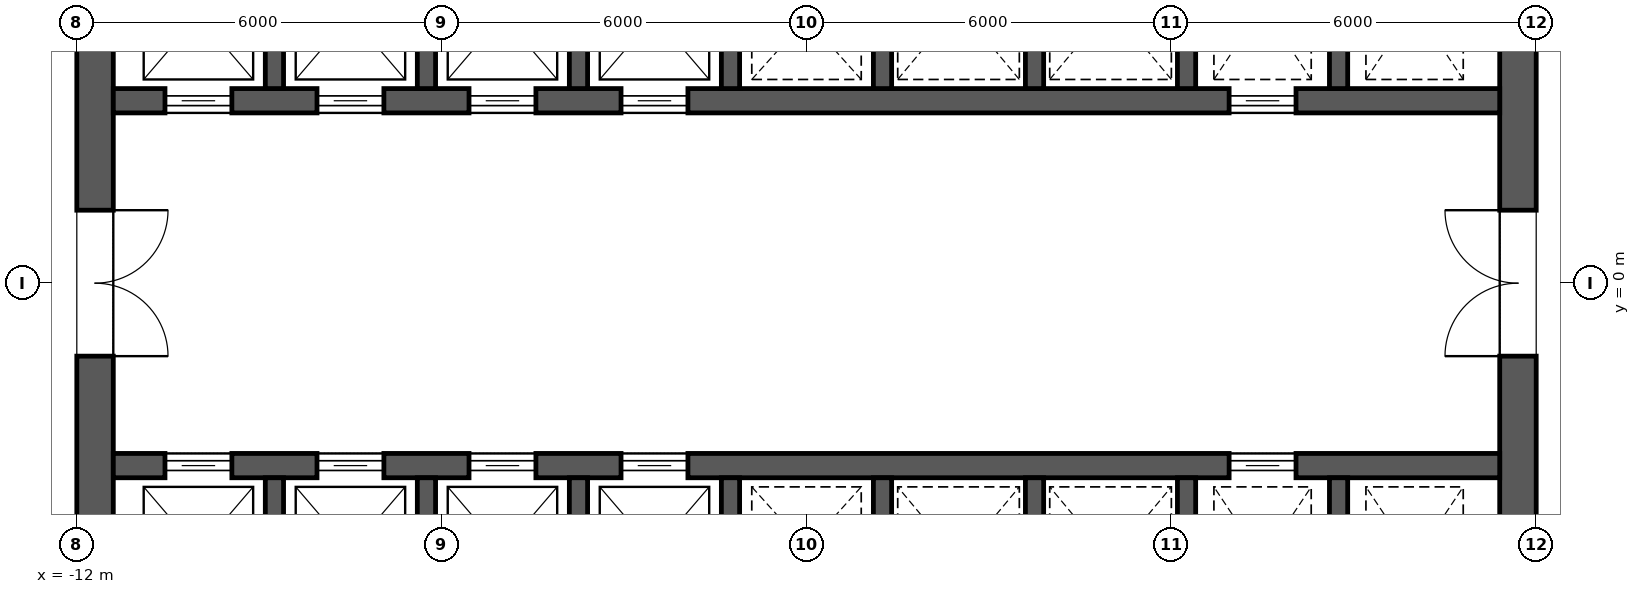
"""IFC4 building model, lengths in metres.
Left out: names, types, materials, properties, quantities, classifications, styles, units other than length and angle.
Written with IfcOpenShell. Run it as: python <this file> out.ifc"""

import sys

from ifc_helpers import new_model, si_unit, direction, frame, frame_2d, origin, place, context, subcontext, project, spatial, rectangle, extrude, element, fill, save


model = new_model("IFC4")
c1 = context("Model", 3, precision=1e-05, world=origin(), true_north=direction((0.0, 1.0)))
c2 = subcontext(c1, "Body", "Model", "MODEL_VIEW")
j1 = project(units=[si_unit("LENGTHUNIT", "METRE"), si_unit("PLANEANGLEUNIT", "RADIAN")], contexts=[c1])
p1 = place(None, origin())
s1 = spatial("IfcSite", under=j1, at=p1, CompositionType="ELEMENT")
p2 = place(p1, origin())
s2 = spatial("IfcBuilding", under=s1, at=p2, CompositionType="ELEMENT")
p3 = place(p2, frame((0.0, 0.0, 73.9)))
s3 = spatial("IfcBuildingStorey", under=s2, at=p3, CompositionType="ELEMENT", Elevation=73.9)
p4 = place(p3, frame((11.7, -11.4, 0.0), z_axis=(0.0, 0.0, 1.0), x_axis=(0.0, 1.0, 0.0)))
e1 = element("IfcWall", 1, at=p4, inside=s3, PredefinedType="SHEAR", context=c2, shape_type="SweptSolid", body=[
    extrude(rectangle(XDim=22.8, YDim=0.6, at=frame_2d((11.4, 0.0))), origin(), (0.0, 0.0, 1.0), 4.2),
])
p5 = place(p4, frame((10.2, 0.0, 0.0)))
e2 = element("IfcOpeningElement", 2, at=p5, cuts=e1, PredefinedType="OPENING", context=c2, shape_type="SweptSolid", body=[
    extrude(rectangle(XDim=2.4, YDim=2.1, at=frame_2d((1.2, 1.05))), frame((0.0, 0.312, 0.0), z_axis=(0.0, -1.0, 0.0), x_axis=(1.0, 0.0, 0.0)), (0.0, 0.0, 1.0), 0.624),
])
p6 = place(p4, frame((19.5, 0.0, 0.0)))
e3 = element("IfcOpeningElement", 3, at=p6, cuts=e1, PredefinedType="OPENING", context=c2, shape_type="SweptSolid", body=[
    extrude(rectangle(XDim=1.2, YDim=2.1, at=frame_2d((0.6, 1.05))), frame((0.0, 0.312, 0.0), z_axis=(0.0, -1.0, 0.0), x_axis=(1.0, 0.0, 0.0)), (0.0, 0.0, 1.0), 0.624),
])
p7 = place(p4, frame((2.1, 0.0, 0.0)))
e4 = element("IfcOpeningElement", 4, at=p7, cuts=e1, PredefinedType="OPENING", context=c2, shape_type="SweptSolid", body=[
    extrude(rectangle(XDim=1.2, YDim=2.1, at=frame_2d((0.6, 1.05))), frame((0.0, 0.312, 0.0), z_axis=(0.0, -1.0, 0.0), x_axis=(1.0, 0.0, 0.0)), (0.0, 0.0, 1.0), 0.624),
])
p8 = place(p3, frame((-11.7, -11.4, 0.0), z_axis=(0.0, 0.0, 1.0), x_axis=(0.0, 1.0, 0.0)))
e5 = element("IfcWall", 5, at=p8, inside=s3, PredefinedType="SHEAR", context=c2, shape_type="SweptSolid", body=[
    extrude(rectangle(XDim=22.8, YDim=0.6, at=frame_2d((11.4, 0.0))), origin(), (0.0, 0.0, 1.0), 4.2),
])
p9 = place(p8, frame((10.2, 0.0, 0.0)))
e6 = element("IfcOpeningElement", 6, at=p9, cuts=e5, PredefinedType="OPENING", context=c2, shape_type="SweptSolid", body=[
    extrude(rectangle(XDim=2.4, YDim=2.1, at=frame_2d((1.2, 1.05))), frame((0.0, 0.312, 0.0), z_axis=(0.0, -1.0, 0.0), x_axis=(1.0, 0.0, 0.0)), (0.0, 0.0, 1.0), 0.624),
])
p10 = place(p8, frame((18.925, 0.0, 0.0)))
e7 = element("IfcOpeningElement", 7, at=p10, cuts=e5, PredefinedType="OPENING", context=c2, shape_type="SweptSolid", body=[
    extrude(rectangle(XDim=1.2, YDim=2.1, at=frame_2d((0.6, 1.05))), frame((0.0, 0.312, 0.0), z_axis=(0.0, -1.0, 0.0), x_axis=(1.0, 0.0, 0.0)), (0.0, 0.0, 1.0), 0.624),
])
p11 = place(p8, frame((2.675, 0.0, 0.0)))
e8 = element("IfcOpeningElement", 8, at=p11, cuts=e5, PredefinedType="OPENING", context=c2, shape_type="SweptSolid", body=[
    extrude(rectangle(XDim=1.2, YDim=2.1, at=frame_2d((0.6, 1.05))), frame((0.0, 0.312, 0.0), z_axis=(0.0, -1.0, 0.0), x_axis=(1.0, 0.0, 0.0)), (0.0, 0.0, 1.0), 0.624),
])
p12 = place(p3, frame((-11.4, 3.0, 0.0), z_axis=(0.0, 0.0, 1.0), x_axis=(1.0, 0.0, 0.0)))
e9 = element("IfcWall", 9, at=p12, inside=s3, PredefinedType="SHEAR", context=c2, shape_type="SweptSolid", body=[
    extrude(rectangle(XDim=22.8, YDim=0.4, at=frame_2d((11.4, 0.0))), origin(), (0.0, 0.0, 1.0), 4.2),
])
p13 = place(p12, frame((0.85, 0.0, 0.0)))
e10 = element("IfcOpeningElement", 10, at=p13, cuts=e9, PredefinedType="OPENING", context=c2, shape_type="SweptSolid", body=[
    extrude(rectangle(XDim=1.1, YDim=2.1, at=frame_2d((0.55, 1.05))), frame((0.0, 0.212, 0.0), z_axis=(0.0, -1.0, 0.0), x_axis=(1.0, 0.0, 0.0)), (0.0, 0.0, 1.0), 0.424),
])
p14 = place(p12, frame((3.35, 0.0, 0.0)))
e11 = element("IfcOpeningElement", 11, at=p14, cuts=e9, PredefinedType="OPENING", context=c2, shape_type="SweptSolid", body=[
    extrude(rectangle(XDim=1.1, YDim=2.1, at=frame_2d((0.55, 1.05))), frame((0.0, 0.212, 0.0), z_axis=(0.0, -1.0, 0.0), x_axis=(1.0, 0.0, 0.0)), (0.0, 0.0, 1.0), 0.424),
])
p15 = place(p12, frame((5.85, 0.0, 0.0)))
e12 = element("IfcOpeningElement", 12, at=p15, cuts=e9, PredefinedType="OPENING", context=c2, shape_type="SweptSolid", body=[
    extrude(rectangle(XDim=1.1, YDim=2.1, at=frame_2d((0.55, 1.05))), frame((0.0, 0.212, 0.0), z_axis=(0.0, -1.0, 0.0), x_axis=(1.0, 0.0, 0.0)), (0.0, 0.0, 1.0), 0.424),
])
p16 = place(p12, frame((8.35, 0.0, 0.0)))
e13 = element("IfcOpeningElement", 13, at=p16, cuts=e9, PredefinedType="OPENING", context=c2, shape_type="SweptSolid", body=[
    extrude(rectangle(XDim=1.1, YDim=2.1, at=frame_2d((0.55, 1.05))), frame((0.0, 0.212, 0.0), z_axis=(0.0, -1.0, 0.0), x_axis=(1.0, 0.0, 0.0)), (0.0, 0.0, 1.0), 0.424),
])
p17 = place(p12, frame((18.35, 0.0, 0.0)))
e14 = element("IfcOpeningElement", 14, at=p17, cuts=e9, PredefinedType="OPENING", context=c2, shape_type="SweptSolid", body=[
    extrude(rectangle(XDim=1.1, YDim=2.1, at=frame_2d((0.55, 1.05))), frame((0.0, 0.212, 0.0), z_axis=(0.0, -1.0, 0.0), x_axis=(1.0, 0.0, 0.0)), (0.0, 0.0, 1.0), 0.424),
])
for number, where, z_axis, x_axis in (
    (15, (-8.75, 3.2, 0.0), (0.0, 0.0, 1.0), (0.0, 1.0, 0.0)),
    (16, (-6.25, 3.2, 0.0), (0.0, 0.0, 1.0), (0.0, 1.0, 0.0)),
    (17, (-3.75, 3.2, 0.0), (0.0, 0.0, 1.0), (0.0, 1.0, 0.0)),
    (18, (-1.25, 3.2, 0.0), (0.0, 0.0, 1.0), (0.0, 1.0, 0.0)),
    (19, (1.25, 3.2, 0.0), (0.0, 0.0, 1.0), (0.0, 1.0, 0.0)),
    (20, (3.75, 3.2, 0.0), (0.0, 0.0, 1.0), (0.0, 1.0, 0.0)),
    (21, (6.25, 3.2, 0.0), (0.0, 0.0, 1.0), (0.0, 1.0, 0.0)),
    (22, (8.75, 3.2, 0.0), (0.0, 0.0, 1.0), (0.0, 1.0, 0.0)),
):
    element("IfcWall", number, at=place(p3, frame(where, z_axis=z_axis, x_axis=x_axis)), inside=s3, PredefinedType="SHEAR", context=c2, shape_type="SweptSolid", body=[
        extrude(rectangle(XDim=2.9, YDim=0.3, at=frame_2d((1.45, 0.0))), origin(), (0.0, 0.0, 1.0), 4.2),
    ])
p18 = place(p3, frame((-11.4, -3.0, 0.0), z_axis=(0.0, 0.0, 1.0), x_axis=(1.0, 0.0, 0.0)))
e23 = element("IfcWall", 23, at=p18, inside=s3, PredefinedType="SHEAR", context=c2, shape_type="SweptSolid", body=[
    extrude(rectangle(XDim=22.8, YDim=0.4, at=frame_2d((11.4, 0.0))), origin(), (0.0, 0.0, 1.0), 4.2),
])
p19 = place(p18, frame((0.85, 0.0, 0.0)))
e24 = element("IfcOpeningElement", 24, at=p19, cuts=e23, PredefinedType="OPENING", context=c2, shape_type="SweptSolid", body=[
    extrude(rectangle(XDim=1.1, YDim=2.1, at=frame_2d((0.55, 1.05))), frame((0.0, 0.212, 0.0), z_axis=(0.0, -1.0, 0.0), x_axis=(1.0, 0.0, 0.0)), (0.0, 0.0, 1.0), 0.424),
])
p20 = place(p18, frame((3.35, 0.0, 0.0)))
e25 = element("IfcOpeningElement", 25, at=p20, cuts=e23, PredefinedType="OPENING", context=c2, shape_type="SweptSolid", body=[
    extrude(rectangle(XDim=1.1, YDim=2.1, at=frame_2d((0.55, 1.05))), frame((0.0, 0.212, 0.0), z_axis=(0.0, -1.0, 0.0), x_axis=(1.0, 0.0, 0.0)), (0.0, 0.0, 1.0), 0.424),
])
p21 = place(p18, frame((5.85, 0.0, 0.0)))
e26 = element("IfcOpeningElement", 26, at=p21, cuts=e23, PredefinedType="OPENING", context=c2, shape_type="SweptSolid", body=[
    extrude(rectangle(XDim=1.1, YDim=2.1, at=frame_2d((0.55, 1.05))), frame((0.0, 0.212, 0.0), z_axis=(0.0, -1.0, 0.0), x_axis=(1.0, 0.0, 0.0)), (0.0, 0.0, 1.0), 0.424),
])
p22 = place(p18, frame((8.35, 0.0, 0.0)))
e27 = element("IfcOpeningElement", 27, at=p22, cuts=e23, PredefinedType="OPENING", context=c2, shape_type="SweptSolid", body=[
    extrude(rectangle(XDim=1.1, YDim=2.1, at=frame_2d((0.55, 1.05))), frame((0.0, 0.212, 0.0), z_axis=(0.0, -1.0, 0.0), x_axis=(1.0, 0.0, 0.0)), (0.0, 0.0, 1.0), 0.424),
])
p23 = place(p18, frame((18.35, 0.0, 0.0)))
e28 = element("IfcOpeningElement", 28, at=p23, cuts=e23, PredefinedType="OPENING", context=c2, shape_type="SweptSolid", body=[
    extrude(rectangle(XDim=1.1, YDim=2.1, at=frame_2d((0.55, 1.05))), frame((0.0, 0.212, 0.0), z_axis=(0.0, -1.0, 0.0), x_axis=(1.0, 0.0, 0.0)), (0.0, 0.0, 1.0), 0.424),
])
for number, where, z_axis, x_axis in (
    (29, (-8.75, -6.1, 0.0), (0.0, 0.0, 1.0), (0.0, 1.0, 0.0)),
    (30, (-6.25, -6.1, 0.0), (0.0, 0.0, 1.0), (0.0, 1.0, 0.0)),
    (31, (-3.75, -6.1, 0.0), (0.0, 0.0, 1.0), (0.0, 1.0, 0.0)),
    (32, (-1.25, -6.1, 0.0), (0.0, 0.0, 1.0), (0.0, 1.0, 0.0)),
    (33, (1.25, -6.1, 0.0), (0.0, 0.0, 1.0), (0.0, 1.0, 0.0)),
    (34, (3.75, -6.1, 0.0), (0.0, 0.0, 1.0), (0.0, 1.0, 0.0)),
    (35, (6.25, -6.1, 0.0), (0.0, 0.0, 1.0), (0.0, 1.0, 0.0)),
    (36, (8.75, -6.1, 0.0), (0.0, 0.0, 1.0), (0.0, 1.0, 0.0)),
):
    element("IfcWall", number, at=place(p3, frame(where, z_axis=z_axis, x_axis=x_axis)), inside=s3, PredefinedType="SHEAR", context=c2, shape_type="SweptSolid", body=[
        extrude(rectangle(XDim=2.9, YDim=0.3, at=frame_2d((1.45, 0.0))), origin(), (0.0, 0.0, 1.0), 4.2),
    ])
p24 = place(p13, origin())
e37 = element("IfcDoor", 37, at=p24, inside=s3, OperationType="SLIDING_TO_LEFT", PredefinedType="DOOR", context=c2, shape_type="SweptSolid", body=[
    extrude(rectangle(XDim=1.1, YDim=2.1, at=frame_2d((0.55, 1.05))), frame((0.0, 0.025, 0.0), z_axis=(0.0, -1.0, 0.0), x_axis=(1.0, 0.0, 0.0)), (0.0, 0.0, 1.0), 0.05),
])
fill(e10, e37)
p25 = place(p14, origin())
e38 = element("IfcDoor", 38, at=p25, inside=s3, OperationType="SLIDING_TO_LEFT", PredefinedType="DOOR", context=c2, shape_type="SweptSolid", body=[
    extrude(rectangle(XDim=1.1, YDim=2.1, at=frame_2d((0.55, 1.05))), frame((0.0, 0.025, 0.0), z_axis=(0.0, -1.0, 0.0), x_axis=(1.0, 0.0, 0.0)), (0.0, 0.0, 1.0), 0.05),
])
fill(e11, e38)
p26 = place(p15, origin())
e39 = element("IfcDoor", 39, at=p26, inside=s3, OperationType="SLIDING_TO_LEFT", PredefinedType="DOOR", context=c2, shape_type="SweptSolid", body=[
    extrude(rectangle(XDim=1.1, YDim=2.1, at=frame_2d((0.55, 1.05))), frame((0.0, 0.025, 0.0), z_axis=(0.0, -1.0, 0.0), x_axis=(1.0, 0.0, 0.0)), (0.0, 0.0, 1.0), 0.05),
])
fill(e12, e39)
p27 = place(p16, origin())
e40 = element("IfcDoor", 40, at=p27, inside=s3, OperationType="SLIDING_TO_LEFT", PredefinedType="DOOR", context=c2, shape_type="SweptSolid", body=[
    extrude(rectangle(XDim=1.1, YDim=2.1, at=frame_2d((0.55, 1.05))), frame((0.0, 0.025, 0.0), z_axis=(0.0, -1.0, 0.0), x_axis=(1.0, 0.0, 0.0)), (0.0, 0.0, 1.0), 0.05),
])
fill(e13, e40)
p28 = place(p19, origin())
e41 = element("IfcDoor", 41, at=p28, inside=s3, OperationType="SLIDING_TO_LEFT", PredefinedType="DOOR", context=c2, shape_type="SweptSolid", body=[
    extrude(rectangle(XDim=1.1, YDim=2.1, at=frame_2d((0.55, 1.05))), frame((0.0, 0.025, 0.0), z_axis=(0.0, -1.0, 0.0), x_axis=(1.0, 0.0, 0.0)), (0.0, 0.0, 1.0), 0.05),
])
fill(e24, e41)
p29 = place(p20, origin())
e42 = element("IfcDoor", 42, at=p29, inside=s3, OperationType="SLIDING_TO_LEFT", PredefinedType="DOOR", context=c2, shape_type="SweptSolid", body=[
    extrude(rectangle(XDim=1.1, YDim=2.1, at=frame_2d((0.55, 1.05))), frame((0.0, 0.025, 0.0), z_axis=(0.0, -1.0, 0.0), x_axis=(1.0, 0.0, 0.0)), (0.0, 0.0, 1.0), 0.05),
])
fill(e25, e42)
p30 = place(p21, origin())
e43 = element("IfcDoor", 43, at=p30, inside=s3, OperationType="SLIDING_TO_LEFT", PredefinedType="DOOR", context=c2, shape_type="SweptSolid", body=[
    extrude(rectangle(XDim=1.1, YDim=2.1, at=frame_2d((0.55, 1.05))), frame((0.0, 0.025, 0.0), z_axis=(0.0, -1.0, 0.0), x_axis=(1.0, 0.0, 0.0)), (0.0, 0.0, 1.0), 0.05),
])
fill(e26, e43)
p31 = place(p22, origin())
e44 = element("IfcDoor", 44, at=p31, inside=s3, OperationType="SLIDING_TO_LEFT", PredefinedType="DOOR", context=c2, shape_type="SweptSolid", body=[
    extrude(rectangle(XDim=1.1, YDim=2.1, at=frame_2d((0.55, 1.05))), frame((0.0, 0.025, 0.0), z_axis=(0.0, -1.0, 0.0), x_axis=(1.0, 0.0, 0.0)), (0.0, 0.0, 1.0), 0.05),
])
fill(e27, e44)
p32 = place(p17, origin())
e45 = element("IfcDoor", 45, at=p32, inside=s3, OperationType="SLIDING_TO_LEFT", PredefinedType="DOOR", context=c2, shape_type="SweptSolid", body=[
    extrude(rectangle(XDim=1.1, YDim=2.1, at=frame_2d((0.55, 1.05))), frame((0.0, 0.025, 0.0), z_axis=(0.0, -1.0, 0.0), x_axis=(1.0, 0.0, 0.0)), (0.0, 0.0, 1.0), 0.05),
])
fill(e14, e45)
p33 = place(p23, origin())
e46 = element("IfcDoor", 46, at=p33, inside=s3, OperationType="SLIDING_TO_LEFT", PredefinedType="DOOR", context=c2, shape_type="SweptSolid", body=[
    extrude(rectangle(XDim=1.1, YDim=2.1, at=frame_2d((0.55, 1.05))), frame((0.0, 0.025, 0.0), z_axis=(0.0, -1.0, 0.0), x_axis=(1.0, 0.0, 0.0)), (0.0, 0.0, 1.0), 0.05),
])
fill(e28, e46)
p34 = place(p9, frame((2.4, 0.0, 0.0), z_axis=(0.0, 0.0, 1.0), x_axis=(-1.0, 0.0, 0.0)))
e47 = element("IfcDoor", 47, at=p34, inside=s3, OperationType="DOUBLE_DOOR_SINGLE_SWING", PredefinedType="DOOR", context=c2, shape_type="SweptSolid", body=[
    extrude(rectangle(XDim=2.4, YDim=2.1, at=frame_2d((1.2, 1.05))), frame((0.0, 0.025, 0.0), z_axis=(0.0, -1.0, 0.0), x_axis=(1.0, 0.0, 0.0)), (0.0, 0.0, 1.0), 0.05),
])
fill(e6, e47)
p35 = place(p5, origin())
e48 = element("IfcDoor", 48, at=p35, inside=s3, OperationType="DOUBLE_DOOR_SINGLE_SWING", PredefinedType="DOOR", context=c2, shape_type="SweptSolid", body=[
    extrude(rectangle(XDim=2.4, YDim=2.1, at=frame_2d((1.2, 1.05))), frame((0.0, 0.025, 0.0), z_axis=(0.0, -1.0, 0.0), x_axis=(1.0, 0.0, 0.0)), (0.0, 0.0, 1.0), 0.05),
])
fill(e2, e48)
save(model, sys.argv[1])
